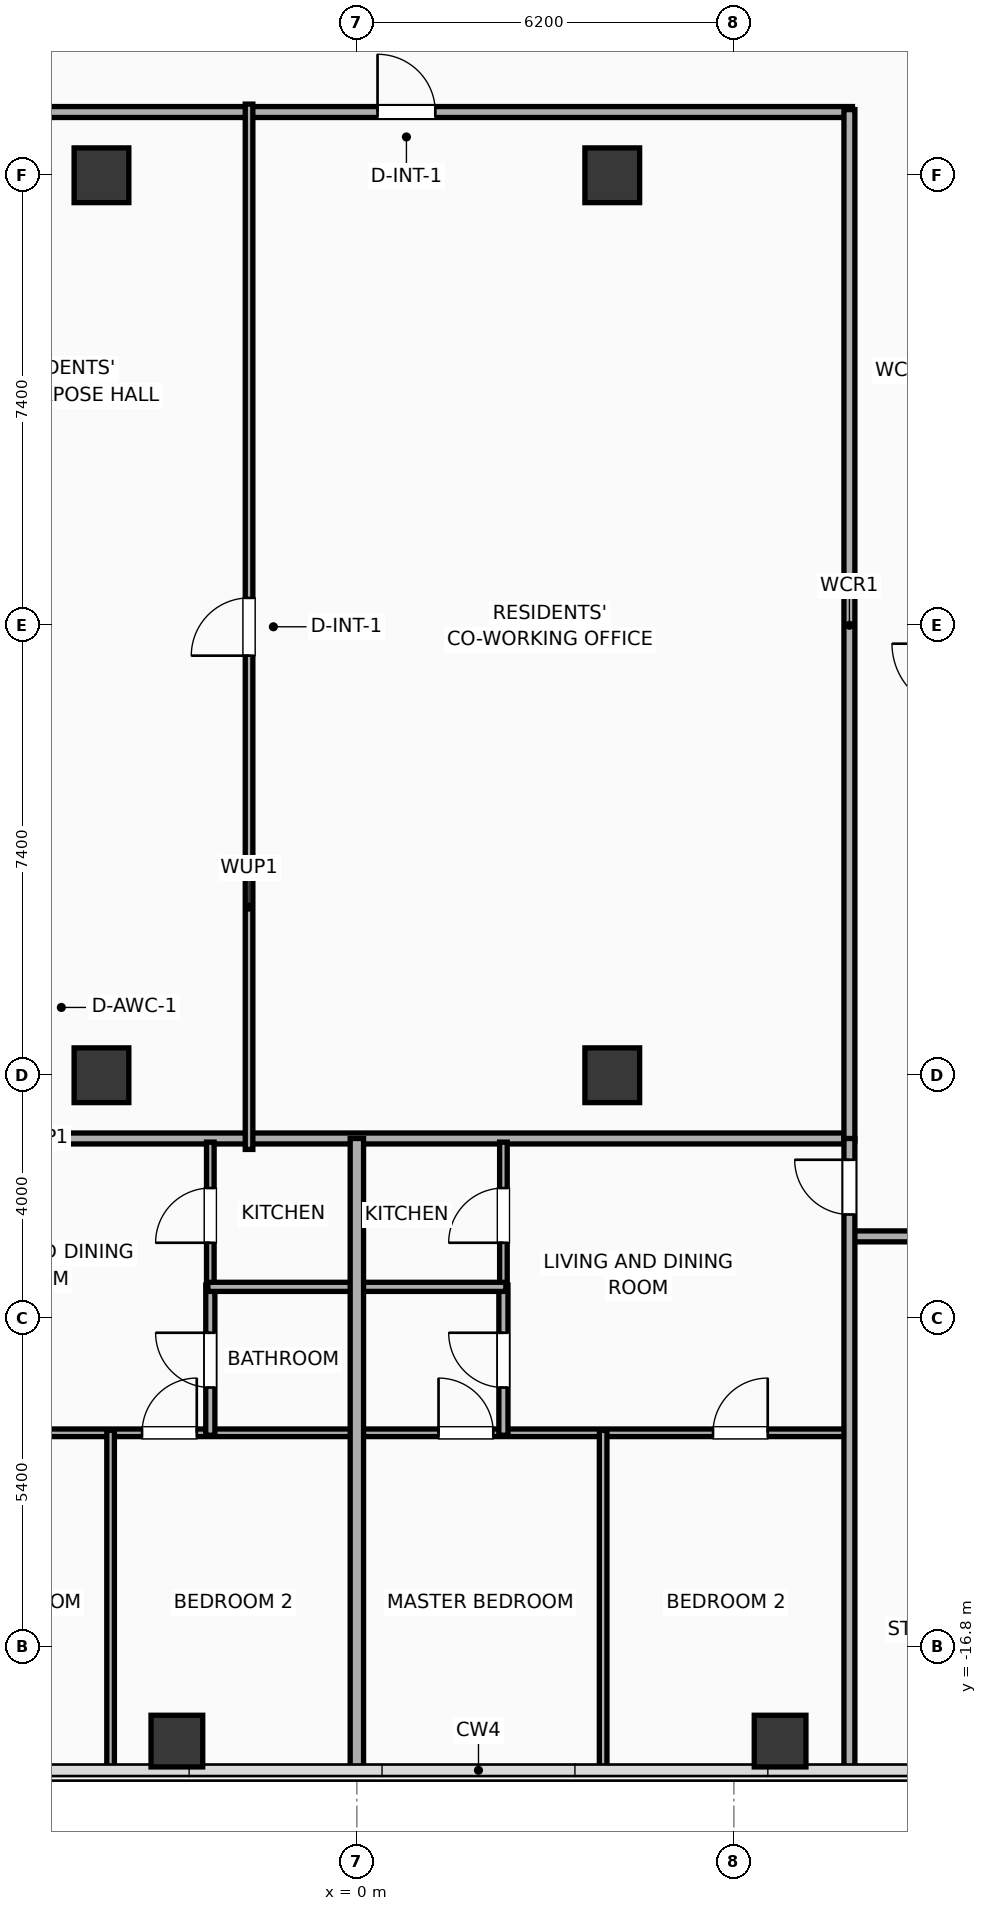
"""IFC4 building model, lengths in metres.
Left out: names, types, materials, properties, quantities, classifications, styles, units other than length and angle.
Written with IfcOpenShell. Run it as: python <this file> out.ifc"""

import sys

from ifc_helpers import new_model, si_unit, direction, frame, frame_2d, origin, origin_2d, place, context, subcontext, project, spatial, rectangle, hollow_rectangle, extrude, element, fill, save


model = new_model("IFC4")
c1 = context("Model", 3, precision=1e-05, world=origin(), true_north=direction((0.0, 1.0)))
c2 = subcontext(c1, "Body", "Model", "MODEL_VIEW")
j1 = project(units=[si_unit("LENGTHUNIT", "METRE"), si_unit("PLANEANGLEUNIT", "RADIAN")], contexts=[c1])
p1 = place(None, origin())
s1 = spatial("IfcSite", under=j1, at=p1, CompositionType="ELEMENT")
p2 = place(p1, origin())
s2 = spatial("IfcBuilding", under=s1, at=p2, CompositionType="ELEMENT")
p3 = place(p2, frame((0.0, 0.0, 211.9)))
s3 = spatial("IfcBuildingStorey", under=s2, at=p3, CompositionType="ELEMENT", Elevation=211.9)
for number, where, z_axis, x_axis in (
    (1, (-4.2, -7.4, 0.0), (0.0, 0.0, 1.0), (1.0, 0.0, 0.0)),
    (2, (-4.2, 7.4, 0.0), (0.0, 0.0, 1.0), (1.0, 0.0, 0.0)),
    (3, (4.2, -7.4, 0.0), (0.0, 0.0, 1.0), (1.0, 0.0, 0.0)),
    (4, (4.2, 7.4, 0.0), (0.0, 0.0, 1.0), (1.0, 0.0, 0.0)),
):
    element("IfcColumn", number, at=place(p3, frame(where, z_axis=z_axis, x_axis=x_axis)), inside=s3, PredefinedType="COLUMN", context=c2, shape_type="SweptSolid", body=[
        extrude(rectangle(XDim=0.9, YDim=0.9, at=origin_2d()), origin(), (0.0, 0.0, 1.0), 3.9),
    ])
for number, where, z_axis, x_axis in (
    (5, (-2.96, -18.35, 0.0), (0.0, 0.0, 1.0), (1.0, 0.0, 0.0)),
    (6, (6.96, -18.35, 0.0), (0.0, 0.0, 1.0), (1.0, 0.0, 0.0)),
):
    element("IfcColumn", number, at=place(p3, frame(where, z_axis=z_axis, x_axis=x_axis)), inside=s3, PredefinedType="COLUMN", context=c2, shape_type="SweptSolid", body=[
        extrude(hollow_rectangle(XDim=0.85, YDim=0.85, WallThickness=0.028, at=origin_2d()), origin(), (0.0, 0.0, 1.0), 3.9),
    ])
p4 = place(p3, frame((-8.15, 8.44, 0.0), z_axis=(0.0, 0.0, 1.0), x_axis=(1.0, 0.0, 0.0)))
e7 = element("IfcWall", 7, at=p4, inside=s3, PredefinedType="PARTITIONING", context=c2, shape_type="SweptSolid", body=[
    extrude(rectangle(XDim=16.3, YDim=0.18, at=frame_2d((8.15, 0.0))), origin(), (0.0, 0.0, 1.0), 3.65),
])
p5 = place(p4, frame((8.49, 0.0, 0.0)))
e8 = element("IfcOpeningElement", 8, at=p5, cuts=e7, PredefinedType="OPENING", context=c2, shape_type="SweptSolid", body=[
    extrude(rectangle(XDim=0.95, YDim=2.05, at=frame_2d((0.475, 1.025))), frame((0.0, 0.1, 0.0), z_axis=(0.0, -1.0, 0.0), x_axis=(1.0, 0.0, 0.0)), (0.0, 0.0, 1.0), 0.2),
])
p6 = place(p3, frame((-8.15, -8.44, 0.0), z_axis=(0.0, 0.0, 1.0), x_axis=(1.0, 0.0, 0.0)))
e9 = element("IfcWall", 9, at=p6, inside=s3, PredefinedType="PARTITIONING", context=c2, shape_type="SweptSolid", body=[
    extrude(rectangle(XDim=16.3, YDim=0.18, at=frame_2d((8.15, 0.0))), origin(), (0.0, 0.0, 1.0), 3.65),
])
p7 = place(p3, frame((8.1, -8.48, 0.0), z_axis=(0.0, 0.0, 1.0), x_axis=(0.0, 1.0, 0.0)))
e10 = element("IfcWall", 10, at=p7, inside=s3, PredefinedType="PARTITIONING", context=c2, shape_type="SweptSolid", body=[
    extrude(rectangle(XDim=16.96, YDim=0.18, at=frame_2d((8.48, 0.0))), origin(), (0.0, 0.0, 1.0), 3.65),
])
p8 = place(p3, frame((-1.773, -8.62, 0.0), z_axis=(0.0, 0.0, 1.0), x_axis=(0.0, 1.0, 0.0)))
e11 = element("IfcWall", 11, at=p8, inside=s3, PredefinedType="PARTITIONING", context=c2, shape_type="SweptSolid", body=[
    extrude(rectangle(XDim=17.19, YDim=0.125, at=frame_2d((8.595, 0.0))), origin(), (0.0, 0.0, 1.0), 3.65),
])
p9 = place(p8, frame((8.12, 0.0, 0.0)))
e12 = element("IfcOpeningElement", 12, at=p9, cuts=e11, PredefinedType="OPENING", context=c2, shape_type="SweptSolid", body=[
    extrude(rectangle(XDim=0.95, YDim=2.05, at=frame_2d((0.475, 1.025))), frame((0.0, 0.073, 0.0), z_axis=(0.0, -1.0, 0.0), x_axis=(1.0, 0.0, 0.0)), (0.0, 0.0, 1.0), 0.145),
])
p10 = place(p3, frame((8.08, -10.05, 0.0), z_axis=(0.0, 0.0, 1.0), x_axis=(1.0, 0.0, 0.0)))
e13 = element("IfcWall", 13, at=p10, inside=s3, PredefinedType="PARTITIONING", context=c2, shape_type="SweptSolid", body=[
    extrude(rectangle(XDim=22.15, YDim=0.18, at=frame_2d((11.075, 0.0))), origin(), (0.0, 0.0, 1.0), 3.65),
])
p11 = place(p10, frame((1.844, 0.0, 0.0)))
e14 = element("IfcOpeningElement", 14, at=p11, cuts=e13, PredefinedType="OPENING", context=c2, shape_type="SweptSolid", body=[
    extrude(rectangle(XDim=1.15, YDim=2.05, at=frame_2d((0.575, 1.025))), frame((0.0, 0.1, 0.0), z_axis=(0.0, -1.0, 0.0), x_axis=(1.0, 0.0, 0.0)), (0.0, 0.0, 1.0), 0.2),
])
p12 = place(p10, frame((9.229, 0.0, 0.0)))
e15 = element("IfcOpeningElement", 15, at=p12, cuts=e13, PredefinedType="OPENING", context=c2, shape_type="SweptSolid", body=[
    extrude(rectangle(XDim=1.15, YDim=2.05, at=frame_2d((0.575, 1.025))), frame((0.0, 0.1, 0.0), z_axis=(0.0, -1.0, 0.0), x_axis=(1.0, 0.0, 0.0)), (0.0, 0.0, 1.0), 0.2),
])
p13 = place(p10, frame((18.191, 0.0, 0.0)))
e16 = element("IfcOpeningElement", 16, at=p13, cuts=e13, PredefinedType="OPENING", context=c2, shape_type="SweptSolid", body=[
    extrude(rectangle(XDim=0.9, YDim=2.05, at=frame_2d((0.45, 1.025))), frame((0.0, 0.1, 0.0), z_axis=(0.0, -1.0, 0.0), x_axis=(1.0, 0.0, 0.0)), (0.0, 0.0, 1.0), 0.2),
])
p14 = place(p3, frame((-8.08, -13.28, 0.0), z_axis=(0.0, 0.0, 1.0), x_axis=(1.0, 0.0, 0.0)))
e17 = element("IfcWall", 17, at=p14, inside=s3, PredefinedType="PARTITIONING", context=c2, shape_type="SweptSolid", body=[
    extrude(rectangle(XDim=8.06, YDim=0.125, at=frame_2d((4.03, 0.0))), origin(), (0.0, 0.0, 1.0), 3.65),
])
p15 = place(p14, frame((1.323, 0.0, 0.0)))
e18 = element("IfcOpeningElement", 18, at=p15, cuts=e17, PredefinedType="OPENING", context=c2, shape_type="SweptSolid", body=[
    extrude(rectangle(XDim=0.9, YDim=2.05, at=frame_2d((0.45, 1.025))), frame((0.0, 0.073, 0.0), z_axis=(0.0, -1.0, 0.0), x_axis=(1.0, 0.0, 0.0)), (0.0, 0.0, 1.0), 0.145),
])
p16 = place(p14, frame((4.547, 0.0, 0.0)))
e19 = element("IfcOpeningElement", 19, at=p16, cuts=e17, PredefinedType="OPENING", context=c2, shape_type="SweptSolid", body=[
    extrude(rectangle(XDim=0.9, YDim=2.05, at=frame_2d((0.45, 1.025))), frame((0.0, 0.073, 0.0), z_axis=(0.0, -1.0, 0.0), x_axis=(1.0, 0.0, 0.0)), (0.0, 0.0, 1.0), 0.145),
])
p17 = place(p3, frame((-2.41, -10.91, 0.0), z_axis=(0.0, 0.0, 1.0), x_axis=(0.0, 1.0, 0.0)))
e20 = element("IfcWall", 20, at=p17, inside=s3, PredefinedType="PARTITIONING", context=c2, shape_type="SweptSolid", body=[
    extrude(rectangle(XDim=2.41, YDim=0.125, at=frame_2d((1.205, 0.0))), origin(), (0.0, 0.0, 1.0), 3.65),
])
p18 = place(p17, frame((0.755, 0.0, 0.0)))
e21 = element("IfcOpeningElement", 21, at=p18, cuts=e20, PredefinedType="OPENING", context=c2, shape_type="SweptSolid", body=[
    extrude(rectangle(XDim=0.9, YDim=2.05, at=frame_2d((0.45, 1.025))), frame((0.0, 0.073, 0.0), z_axis=(0.0, -1.0, 0.0), x_axis=(1.0, 0.0, 0.0)), (0.0, 0.0, 1.0), 0.145),
])
p19 = place(p3, frame((-2.41, -13.32, 0.0), z_axis=(0.0, 0.0, 1.0), x_axis=(0.0, 1.0, 0.0)))
e22 = element("IfcWall", 22, at=p19, inside=s3, PredefinedType="PLUMBINGWALL", context=c2, shape_type="SweptSolid", body=[
    extrude(rectangle(XDim=2.47, YDim=0.15, at=frame_2d((1.235, 0.0))), origin(), (0.0, 0.0, 1.0), 3.65),
])
p20 = place(p19, frame((0.785, 0.0, 0.0)))
e23 = element("IfcOpeningElement", 23, at=p20, cuts=e22, PredefinedType="OPENING", context=c2, shape_type="SweptSolid", body=[
    extrude(rectangle(XDim=0.9, YDim=2.05, at=frame_2d((0.45, 1.025))), frame((0.0, 0.085, 0.0), z_axis=(0.0, -1.0, 0.0), x_axis=(1.0, 0.0, 0.0)), (0.0, 0.0, 1.0), 0.17),
])
p21 = place(p3, frame((-2.45, -10.88, 0.0), z_axis=(0.0, 0.0, 1.0), x_axis=(1.0, 0.0, 0.0)))
e24 = element("IfcWall", 24, at=p21, inside=s3, PredefinedType="PLUMBINGWALL", context=c2, shape_type="SweptSolid", body=[
    extrude(rectangle(XDim=2.43, YDim=0.15, at=frame_2d((1.215, 0.0))), origin(), (0.0, 0.0, 1.0), 3.65),
])
p22 = place(p3, frame((-4.05, -18.83, 0.0), z_axis=(0.0, 0.0, 1.0), x_axis=(0.0, 1.0, 0.0)))
e25 = element("IfcWall", 25, at=p22, inside=s3, PredefinedType="PARTITIONING", context=c2, shape_type="SweptSolid", body=[
    extrude(rectangle(XDim=5.59, YDim=0.125, at=frame_2d((2.795, 0.0))), origin(), (0.0, 0.0, 1.0), 3.65),
])
p23 = place(p3, frame((0.02, -13.28, 0.0), z_axis=(0.0, 0.0, 1.0), x_axis=(1.0, 0.0, 0.0)))
e26 = element("IfcWall", 26, at=p23, inside=s3, PredefinedType="PARTITIONING", context=c2, shape_type="SweptSolid", body=[
    extrude(rectangle(XDim=8.06, YDim=0.125, at=frame_2d((4.03, 0.0))), origin(), (0.0, 0.0, 1.0), 3.65),
])
p24 = place(p23, frame((1.323, 0.0, 0.0)))
e27 = element("IfcOpeningElement", 27, at=p24, cuts=e26, PredefinedType="OPENING", context=c2, shape_type="SweptSolid", body=[
    extrude(rectangle(XDim=0.9, YDim=2.05, at=frame_2d((0.45, 1.025))), frame((0.0, 0.073, 0.0), z_axis=(0.0, -1.0, 0.0), x_axis=(1.0, 0.0, 0.0)), (0.0, 0.0, 1.0), 0.145),
])
p25 = place(p23, frame((5.837, 0.0, 0.0)))
e28 = element("IfcOpeningElement", 28, at=p25, cuts=e26, PredefinedType="OPENING", context=c2, shape_type="SweptSolid", body=[
    extrude(rectangle(XDim=0.9, YDim=2.05, at=frame_2d((0.45, 1.025))), frame((0.0, 0.073, 0.0), z_axis=(0.0, -1.0, 0.0), x_axis=(1.0, 0.0, 0.0)), (0.0, 0.0, 1.0), 0.145),
])
p26 = place(p3, frame((2.41, -10.91, 0.0), z_axis=(0.0, 0.0, 1.0), x_axis=(0.0, 1.0, 0.0)))
e29 = element("IfcWall", 29, at=p26, inside=s3, PredefinedType="PARTITIONING", context=c2, shape_type="SweptSolid", body=[
    extrude(rectangle(XDim=2.41, YDim=0.125, at=frame_2d((1.205, 0.0))), origin(), (0.0, 0.0, 1.0), 3.65),
])
p27 = place(p26, frame((0.755, 0.0, 0.0)))
e30 = element("IfcOpeningElement", 30, at=p27, cuts=e29, PredefinedType="OPENING", context=c2, shape_type="SweptSolid", body=[
    extrude(rectangle(XDim=0.9, YDim=2.05, at=frame_2d((0.45, 1.025))), frame((0.0, 0.073, 0.0), z_axis=(0.0, -1.0, 0.0), x_axis=(1.0, 0.0, 0.0)), (0.0, 0.0, 1.0), 0.145),
])
p28 = place(p3, frame((2.41, -13.32, 0.0), z_axis=(0.0, 0.0, 1.0), x_axis=(0.0, 1.0, 0.0)))
e31 = element("IfcWall", 31, at=p28, inside=s3, PredefinedType="PLUMBINGWALL", context=c2, shape_type="SweptSolid", body=[
    extrude(rectangle(XDim=2.47, YDim=0.15, at=frame_2d((1.235, 0.0))), origin(), (0.0, 0.0, 1.0), 3.65),
])
p29 = place(p28, frame((0.785, 0.0, 0.0)))
e32 = element("IfcOpeningElement", 32, at=p29, cuts=e31, PredefinedType="OPENING", context=c2, shape_type="SweptSolid", body=[
    extrude(rectangle(XDim=0.9, YDim=2.05, at=frame_2d((0.45, 1.025))), frame((0.0, 0.085, 0.0), z_axis=(0.0, -1.0, 0.0), x_axis=(1.0, 0.0, 0.0)), (0.0, 0.0, 1.0), 0.17),
])
p30 = place(p3, frame((0.02, -10.88, 0.0), z_axis=(0.0, 0.0, 1.0), x_axis=(1.0, 0.0, 0.0)))
e33 = element("IfcWall", 33, at=p30, inside=s3, PredefinedType="PLUMBINGWALL", context=c2, shape_type="SweptSolid", body=[
    extrude(rectangle(XDim=2.43, YDim=0.15, at=frame_2d((1.215, 0.0))), origin(), (0.0, 0.0, 1.0), 3.65),
])
p31 = place(p3, frame((4.05, -18.83, 0.0), z_axis=(0.0, 0.0, 1.0), x_axis=(0.0, 1.0, 0.0)))
e34 = element("IfcWall", 34, at=p31, inside=s3, PredefinedType="PARTITIONING", context=c2, shape_type="SweptSolid", body=[
    extrude(rectangle(XDim=5.59, YDim=0.125, at=frame_2d((2.795, 0.0))), origin(), (0.0, 0.0, 1.0), 3.65),
])
p32 = place(p3, frame((8.1, -18.83, 0.0), z_axis=(0.0, 0.0, 1.0), x_axis=(0.0, 1.0, 0.0)))
e35 = element("IfcWall", 35, at=p32, inside=s3, PredefinedType="PARTITIONING", context=c2, shape_type="SweptSolid", body=[
    extrude(rectangle(XDim=10.39, YDim=0.18, at=frame_2d((5.195, 0.0))), origin(), (0.0, 0.0, 1.0), 3.65),
])
p33 = place(p32, frame((9.14, 0.0, 0.0)))
e36 = element("IfcOpeningElement", 36, at=p33, cuts=e35, PredefinedType="OPENING", context=c2, shape_type="SweptSolid", body=[
    extrude(rectangle(XDim=0.9, YDim=2.05, at=frame_2d((0.45, 1.025))), frame((0.0, 0.1, 0.0), z_axis=(0.0, -1.0, 0.0), x_axis=(1.0, 0.0, 0.0)), (0.0, 0.0, 1.0), 0.2),
])
p34 = place(p3, frame((0.0, -18.83, 0.0), z_axis=(0.0, 0.0, 1.0), x_axis=(0.0, 1.0, 0.0)))
e37 = element("IfcWall", 37, at=p34, inside=s3, PredefinedType="PARTITIONING", context=c2, shape_type="SweptSolid", body=[
    extrude(rectangle(XDim=10.39, YDim=0.22, at=frame_2d((5.195, 0.0))), origin(), (0.0, 0.0, 1.0), 3.65),
])
p35 = place(p5, origin())
e38 = element("IfcDoor", 38, at=p35, inside=s3, OperationType="SINGLE_SWING_LEFT", PredefinedType="DOOR", context=c2, shape_type="SweptSolid", body=[
    extrude(rectangle(XDim=0.95, YDim=2.05, at=frame_2d((0.475, 1.025))), frame((0.0, 0.025, 0.0), z_axis=(0.0, -1.0, 0.0), x_axis=(1.0, 0.0, 0.0)), (0.0, 0.0, 1.0), 0.05),
])
fill(e8, e38)
p36 = place(p9, origin())
e39 = element("IfcDoor", 39, at=p36, inside=s3, OperationType="SINGLE_SWING_LEFT", PredefinedType="DOOR", context=c2, shape_type="SweptSolid", body=[
    extrude(rectangle(XDim=0.95, YDim=2.05, at=frame_2d((0.475, 1.025))), frame((0.0, 0.025, 0.0), z_axis=(0.0, -1.0, 0.0), x_axis=(1.0, 0.0, 0.0)), (0.0, 0.0, 1.0), 0.05),
])
fill(e12, e39)
p37 = place(p16, origin())
e40 = element("IfcDoor", 40, at=p37, inside=s3, OperationType="SINGLE_SWING_RIGHT", PredefinedType="DOOR", context=c2, shape_type="SweptSolid", body=[
    extrude(rectangle(XDim=0.9, YDim=2.05, at=frame_2d((0.45, 1.025))), frame((0.0, 0.025, 0.0), z_axis=(0.0, -1.0, 0.0), x_axis=(1.0, 0.0, 0.0)), (0.0, 0.0, 1.0), 0.05),
])
fill(e19, e40)
p38 = place(p18, origin())
e41 = element("IfcDoor", 41, at=p38, inside=s3, OperationType="SINGLE_SWING_LEFT", PredefinedType="DOOR", context=c2, shape_type="SweptSolid", body=[
    extrude(rectangle(XDim=0.9, YDim=2.05, at=frame_2d((0.45, 1.025))), frame((0.0, 0.025, 0.0), z_axis=(0.0, -1.0, 0.0), x_axis=(1.0, 0.0, 0.0)), (0.0, 0.0, 1.0), 0.05),
])
fill(e21, e41)
p39 = place(p20, origin())
e42 = element("IfcDoor", 42, at=p39, inside=s3, OperationType="SINGLE_SWING_RIGHT", PredefinedType="DOOR", context=c2, shape_type="SweptSolid", body=[
    extrude(rectangle(XDim=0.9, YDim=2.05, at=frame_2d((0.45, 1.025))), frame((0.0, 0.025, 0.0), z_axis=(0.0, -1.0, 0.0), x_axis=(1.0, 0.0, 0.0)), (0.0, 0.0, 1.0), 0.05),
])
fill(e23, e42)
p40 = place(p24, origin())
e43 = element("IfcDoor", 43, at=p40, inside=s3, OperationType="SINGLE_SWING_LEFT", PredefinedType="DOOR", context=c2, shape_type="SweptSolid", body=[
    extrude(rectangle(XDim=0.9, YDim=2.05, at=frame_2d((0.45, 1.025))), frame((0.0, 0.025, 0.0), z_axis=(0.0, -1.0, 0.0), x_axis=(1.0, 0.0, 0.0)), (0.0, 0.0, 1.0), 0.05),
])
fill(e27, e43)
p41 = place(p25, origin())
e44 = element("IfcDoor", 44, at=p41, inside=s3, OperationType="SINGLE_SWING_RIGHT", PredefinedType="DOOR", context=c2, shape_type="SweptSolid", body=[
    extrude(rectangle(XDim=0.9, YDim=2.05, at=frame_2d((0.45, 1.025))), frame((0.0, 0.025, 0.0), z_axis=(0.0, -1.0, 0.0), x_axis=(1.0, 0.0, 0.0)), (0.0, 0.0, 1.0), 0.05),
])
fill(e28, e44)
p42 = place(p27, origin())
e45 = element("IfcDoor", 45, at=p42, inside=s3, OperationType="SINGLE_SWING_LEFT", PredefinedType="DOOR", context=c2, shape_type="SweptSolid", body=[
    extrude(rectangle(XDim=0.9, YDim=2.05, at=frame_2d((0.45, 1.025))), frame((0.0, 0.025, 0.0), z_axis=(0.0, -1.0, 0.0), x_axis=(1.0, 0.0, 0.0)), (0.0, 0.0, 1.0), 0.05),
])
fill(e30, e45)
p43 = place(p29, origin())
e46 = element("IfcDoor", 46, at=p43, inside=s3, OperationType="SINGLE_SWING_RIGHT", PredefinedType="DOOR", context=c2, shape_type="SweptSolid", body=[
    extrude(rectangle(XDim=0.9, YDim=2.05, at=frame_2d((0.45, 1.025))), frame((0.0, 0.025, 0.0), z_axis=(0.0, -1.0, 0.0), x_axis=(1.0, 0.0, 0.0)), (0.0, 0.0, 1.0), 0.05),
])
fill(e32, e46)
p44 = place(p33, origin())
e47 = element("IfcDoor", 47, at=p44, inside=s3, OperationType="SINGLE_SWING_RIGHT", PredefinedType="DOOR", context=c2, shape_type="SweptSolid", body=[
    extrude(rectangle(XDim=0.9, YDim=2.05, at=frame_2d((0.45, 1.025))), frame((0.0, 0.025, 0.0), z_axis=(0.0, -1.0, 0.0), x_axis=(1.0, 0.0, 0.0)), (0.0, 0.0, 1.0), 0.05),
])
fill(e36, e47)
save(model, sys.argv[1])
